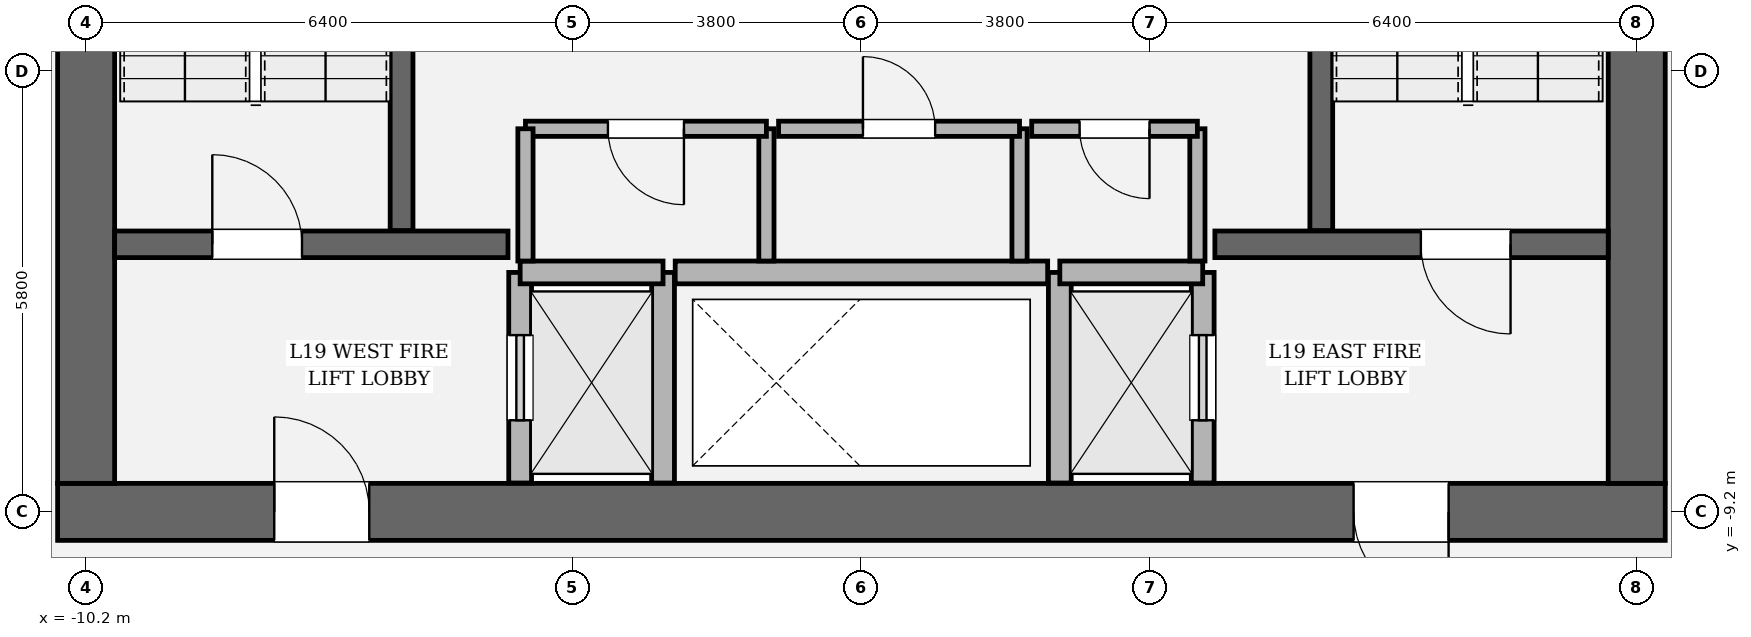
"""IFC4 building model, lengths in metres.
Left out: names, types, materials, properties, quantities, classifications, styles, units other than length and angle.
Written with IfcOpenShell. Run it as: python <this file> out.ifc"""

import sys

from ifc_helpers import new_model, si_unit, direction, frame, frame_2d, origin, place, context, subcontext, project, spatial, rectangle, extrude, element, fill, save


model = new_model("IFC4")
c1 = context("Model", 3, precision=1e-05, world=origin(), true_north=direction((0.0, 1.0)))
c2 = subcontext(c1, "Body", "Model", "MODEL_VIEW")
j1 = project(units=[si_unit("LENGTHUNIT", "METRE"), si_unit("PLANEANGLEUNIT", "RADIAN")], contexts=[c1])
p1 = place(None, origin())
s1 = spatial("IfcSite", under=j1, at=p1, CompositionType="ELEMENT")
p2 = place(p1, origin())
s2 = spatial("IfcBuilding", under=s1, at=p2, CompositionType="ELEMENT")
p3 = place(p2, frame((0.0, 0.0, 84.9)))
s3 = spatial("IfcBuildingStorey", under=s2, at=p3, CompositionType="ELEMENT", Elevation=84.9)
p4 = place(p3, frame((10.575, -9.2, 0.0), z_axis=(0.0, 0.0, 1.0), x_axis=(-1.0, 0.0, 0.0)))
e1 = element("IfcWall", 1, at=p4, inside=s3, PredefinedType="SHEAR", context=c2, shape_type="SweptSolid", body=[
    extrude(rectangle(XDim=21.15, YDim=0.75, at=frame_2d((10.575, 0.0))), origin(), (0.0, 0.0, 1.0), 4.05),
])
p5 = place(p4, frame((2.85, 0.0, 0.0)))
e2 = element("IfcOpeningElement", 2, at=p5, cuts=e1, PredefinedType="OPENING", context=c2, shape_type="SweptSolid", body=[
    extrude(rectangle(XDim=1.25, YDim=2.25, at=frame_2d((0.625, 1.125))), frame((0.0, 0.385, 0.0), z_axis=(0.0, -1.0, 0.0), x_axis=(1.0, 0.0, 0.0)), (0.0, 0.0, 1.0), 0.77),
])
p6 = place(p4, frame((17.05, 0.0, 0.0)))
e3 = element("IfcOpeningElement", 3, at=p6, cuts=e1, PredefinedType="OPENING", context=c2, shape_type="SweptSolid", body=[
    extrude(rectangle(XDim=1.25, YDim=2.25, at=frame_2d((0.625, 1.125))), frame((0.0, 0.385, 0.0), z_axis=(0.0, -1.0, 0.0), x_axis=(1.0, 0.0, 0.0)), (0.0, 0.0, 1.0), 0.77),
])
p7 = place(p3, frame((-10.2, -8.825, 0.0), z_axis=(0.0, 0.0, 1.0), x_axis=(0.0, 1.0, 0.0)))
e4 = element("IfcWall", 4, at=p7, inside=s3, PredefinedType="SHEAR", context=c2, shape_type="SweptSolid", body=[
    extrude(rectangle(XDim=17.65, YDim=0.75, at=frame_2d((8.825, 0.0))), origin(), (0.0, 0.0, 1.0), 4.05),
])
p8 = place(p7, frame((12.615, 0.0, 0.0)))
e5 = element("IfcOpeningElement", 5, at=p8, cuts=e4, PredefinedType="OPENING", context=c2, shape_type="SweptSolid", body=[
    extrude(rectangle(XDim=1.18, YDim=2.2, at=frame_2d((0.59, 1.1))), frame((0.0, 0.385, 0.0), z_axis=(0.0, -1.0, 0.0), x_axis=(1.0, 0.0, 0.0)), (0.0, 0.0, 1.0), 0.77),
])
p9 = place(p3, frame((10.2, 8.825, 0.0), z_axis=(0.0, 0.0, 1.0), x_axis=(0.0, -1.0, 0.0)))
e6 = element("IfcWall", 6, at=p9, inside=s3, PredefinedType="SHEAR", context=c2, shape_type="SweptSolid", body=[
    extrude(rectangle(XDim=17.65, YDim=0.75, at=frame_2d((8.825, 0.0))), origin(), (0.0, 0.0, 1.0), 4.05),
])
p10 = place(p9, frame((3.855, 0.0, 0.0)))
e7 = element("IfcOpeningElement", 7, at=p10, cuts=e6, PredefinedType="OPENING", context=c2, shape_type="SweptSolid", body=[
    extrude(rectangle(XDim=1.18, YDim=2.2, at=frame_2d((0.59, 1.1))), frame((0.0, 0.385, 0.0), z_axis=(0.0, -1.0, 0.0), x_axis=(1.0, 0.0, 0.0)), (0.0, 0.0, 1.0), 0.77),
])
for number, where, z_axis, x_axis in (
    (8, (-6.05, -5.5, 0.0), (0.0, 0.0, 1.0), (0.0, 1.0, 0.0)),
    (9, (6.05, 3.45, 0.0), (0.0, 0.0, 1.0), (0.0, -1.0, 0.0)),
):
    element("IfcWall", number, at=place(p3, frame(where, z_axis=z_axis, x_axis=x_axis)), inside=s3, PredefinedType="SOLIDWALL", context=c2, shape_type="SweptSolid", body=[
        extrude(rectangle(XDim=8.95, YDim=0.3, at=frame_2d((4.475, 0.0))), origin(), (0.0, 0.0, 1.0), 4.05),
    ])
p11 = place(p3, frame((-9.825, -5.68, 0.0), z_axis=(0.0, 0.0, 1.0), x_axis=(1.0, 0.0, 0.0)))
e10 = element("IfcWall", 10, at=p11, inside=s3, PredefinedType="SOLIDWALL", context=c2, shape_type="SweptSolid", body=[
    extrude(rectangle(XDim=5.175, YDim=0.35, at=frame_2d((2.587, 0.0))), origin(), (0.0, 0.0, 1.0), 4.05),
])
p12 = place(p11, frame((1.285, 0.0, 0.0)))
e11 = element("IfcOpeningElement", 11, at=p12, cuts=e10, PredefinedType="OPENING", context=c2, shape_type="SweptSolid", body=[
    extrude(rectangle(XDim=1.18, YDim=2.2, at=frame_2d((0.59, 1.1))), frame((0.0, 0.185, 0.0), z_axis=(0.0, -1.0, 0.0), x_axis=(1.0, 0.0, 0.0)), (0.0, 0.0, 1.0), 0.37),
])
p13 = place(p3, frame((4.65, -5.68, 0.0), z_axis=(0.0, 0.0, 1.0), x_axis=(1.0, 0.0, 0.0)))
e12 = element("IfcWall", 12, at=p13, inside=s3, PredefinedType="SOLIDWALL", context=c2, shape_type="SweptSolid", body=[
    extrude(rectangle(XDim=5.175, YDim=0.35, at=frame_2d((2.587, 0.0))), origin(), (0.0, 0.0, 1.0), 4.05),
])
p14 = place(p13, frame((2.71, 0.0, 0.0)))
e13 = element("IfcOpeningElement", 13, at=p14, cuts=e12, PredefinedType="OPENING", context=c2, shape_type="SweptSolid", body=[
    extrude(rectangle(XDim=1.18, YDim=2.2, at=frame_2d((0.59, 1.1))), frame((0.0, 0.185, 0.0), z_axis=(0.0, -1.0, 0.0), x_axis=(1.0, 0.0, 0.0)), (0.0, 0.0, 1.0), 0.37),
])
p15 = place(p3, frame((-4.49, -8.82, 0.0), z_axis=(0.0, 0.0, 1.0), x_axis=(0.0, 1.0, 0.0)))
e14 = element("IfcWall", 14, at=p15, inside=s3, PredefinedType="SOLIDWALL", context=c2, shape_type="SweptSolid", body=[
    extrude(rectangle(XDim=2.77, YDim=0.3, at=frame_2d((1.385, 0.0))), origin(), (0.0, 0.0, 1.0), 3.81),
])
p16 = place(p15, frame((0.825, 0.0, 0.0)))
e15 = element("IfcOpeningElement", 15, at=p16, cuts=e14, PredefinedType="OPENING", context=c2, shape_type="SweptSolid", body=[
    extrude(rectangle(XDim=1.12, YDim=2.25, at=frame_2d((0.56, 1.125))), frame((0.0, 0.16, 0.0), z_axis=(0.0, -1.0, 0.0), x_axis=(1.0, 0.0, 0.0)), (0.0, 0.0, 1.0), 0.32),
])
p17 = place(p3, frame((-2.61, -8.82, 0.0), z_axis=(0.0, 0.0, 1.0), x_axis=(0.0, 1.0, 0.0)))
e16 = element("IfcWall", 16, at=p17, inside=s3, PredefinedType="SOLIDWALL", context=c2, shape_type="SweptSolid", body=[
    extrude(rectangle(XDim=2.77, YDim=0.3, at=frame_2d((1.385, 0.0))), origin(), (0.0, 0.0, 1.0), 3.81),
])
p18 = place(p3, frame((-4.49, -6.05, 0.0), z_axis=(0.0, 0.0, 1.0), x_axis=(1.0, 0.0, 0.0)))
e17 = element("IfcWall", 17, at=p18, inside=s3, PredefinedType="SOLIDWALL", context=c2, shape_type="SweptSolid", body=[
    extrude(rectangle(XDim=1.88, YDim=0.3, at=frame_2d((0.94, 0.0))), origin(), (0.0, 0.0, 1.0), 3.81),
])
p19 = place(p3, frame((4.49, -8.82, 0.0), z_axis=(0.0, 0.0, 1.0), x_axis=(0.0, 1.0, 0.0)))
e18 = element("IfcWall", 18, at=p19, inside=s3, PredefinedType="SOLIDWALL", context=c2, shape_type="SweptSolid", body=[
    extrude(rectangle(XDim=2.77, YDim=0.3, at=frame_2d((1.385, 0.0))), origin(), (0.0, 0.0, 1.0), 3.81),
])
p20 = place(p19, frame((0.825, 0.0, 0.0)))
e19 = element("IfcOpeningElement", 19, at=p20, cuts=e18, PredefinedType="OPENING", context=c2, shape_type="SweptSolid", body=[
    extrude(rectangle(XDim=1.12, YDim=2.25, at=frame_2d((0.56, 1.125))), frame((0.0, 0.16, 0.0), z_axis=(0.0, -1.0, 0.0), x_axis=(1.0, 0.0, 0.0)), (0.0, 0.0, 1.0), 0.32),
])
p21 = place(p3, frame((2.61, -8.82, 0.0), z_axis=(0.0, 0.0, 1.0), x_axis=(0.0, 1.0, 0.0)))
e20 = element("IfcWall", 20, at=p21, inside=s3, PredefinedType="SOLIDWALL", context=c2, shape_type="SweptSolid", body=[
    extrude(rectangle(XDim=2.77, YDim=0.3, at=frame_2d((1.385, 0.0))), origin(), (0.0, 0.0, 1.0), 3.81),
])
p22 = place(p3, frame((2.61, -6.05, 0.0), z_axis=(0.0, 0.0, 1.0), x_axis=(1.0, 0.0, 0.0)))
e21 = element("IfcWall", 21, at=p22, inside=s3, PredefinedType="SOLIDWALL", context=c2, shape_type="SweptSolid", body=[
    extrude(rectangle(XDim=1.88, YDim=0.3, at=frame_2d((0.94, 0.0))), origin(), (0.0, 0.0, 1.0), 3.81),
])
p23 = place(p3, frame((-2.45, -6.05, 0.0), z_axis=(0.0, 0.0, 1.0), x_axis=(1.0, 0.0, 0.0)))
e22 = element("IfcWall", 22, at=p23, inside=s3, PredefinedType="SOLIDWALL", context=c2, shape_type="SweptSolid", body=[
    extrude(rectangle(XDim=4.9, YDim=0.3, at=frame_2d((2.45, 0.0))), origin(), (0.0, 0.0, 1.0), 3.81),
])
p24 = place(p3, frame((-1.25, -5.9, 0.0), z_axis=(0.0, 0.0, 1.0), x_axis=(0.0, 1.0, 0.0)))
e23 = element("IfcWall", 23, at=p24, inside=s3, PredefinedType="SOLIDWALL", context=c2, shape_type="SweptSolid", body=[
    extrude(rectangle(XDim=1.74, YDim=0.2, at=frame_2d((0.87, 0.0))), origin(), (0.0, 0.0, 1.0), 3.81),
])
p25 = place(p3, frame((-1.25, -4.16, 0.0), z_axis=(0.0, 0.0, 1.0), x_axis=(-1.0, 0.0, 0.0)))
e24 = element("IfcWall", 24, at=p25, inside=s3, PredefinedType="SOLIDWALL", context=c2, shape_type="SweptSolid", body=[
    extrude(rectangle(XDim=3.17, YDim=0.2, at=frame_2d((1.585, 0.0))), origin(), (0.0, 0.0, 1.0), 3.81),
])
p26 = place(p25, frame((1.085, 0.0, 0.0)))
e25 = element("IfcOpeningElement", 25, at=p26, cuts=e24, PredefinedType="OPENING", context=c2, shape_type="SweptSolid", body=[
    extrude(rectangle(XDim=1.0, YDim=2.15, at=frame_2d((0.5, 1.075))), frame((0.0, 0.11, 0.0), z_axis=(0.0, -1.0, 0.0), x_axis=(1.0, 0.0, 0.0)), (0.0, 0.0, 1.0), 0.22),
])
for number, where, z_axis, x_axis in (
    (26, (-4.42, -4.16, 0.0), (0.0, 0.0, 1.0), (0.0, -1.0, 0.0)),
    (27, (2.08, -5.9, 0.0), (0.0, 0.0, 1.0), (0.0, 1.0, 0.0)),
):
    element("IfcWall", number, at=place(p3, frame(where, z_axis=z_axis, x_axis=x_axis)), inside=s3, PredefinedType="SOLIDWALL", context=c2, shape_type="SweptSolid", body=[
        extrude(rectangle(XDim=1.74, YDim=0.2, at=frame_2d((0.87, 0.0))), origin(), (0.0, 0.0, 1.0), 3.81),
    ])
p27 = place(p3, frame((2.08, -4.16, 0.0), z_axis=(0.0, 0.0, 1.0), x_axis=(-1.0, 0.0, 0.0)))
e28 = element("IfcWall", 28, at=p27, inside=s3, PredefinedType="SOLIDWALL", context=c2, shape_type="SweptSolid", body=[
    extrude(rectangle(XDim=3.17, YDim=0.2, at=frame_2d((1.585, 0.0))), origin(), (0.0, 0.0, 1.0), 3.81),
])
p28 = place(p27, frame((1.11, 0.0, 0.0)))
e29 = element("IfcOpeningElement", 29, at=p28, cuts=e28, PredefinedType="OPENING", context=c2, shape_type="SweptSolid", body=[
    extrude(rectangle(XDim=0.95, YDim=2.15, at=frame_2d((0.475, 1.075))), frame((0.0, 0.11, 0.0), z_axis=(0.0, -1.0, 0.0), x_axis=(1.0, 0.0, 0.0)), (0.0, 0.0, 1.0), 0.22),
])
p29 = place(p3, frame((4.42, -5.9, 0.0), z_axis=(0.0, 0.0, 1.0), x_axis=(0.0, 1.0, 0.0)))
e30 = element("IfcWall", 30, at=p29, inside=s3, PredefinedType="SOLIDWALL", context=c2, shape_type="SweptSolid", body=[
    extrude(rectangle(XDim=1.74, YDim=0.2, at=frame_2d((0.87, 0.0))), origin(), (0.0, 0.0, 1.0), 3.81),
])
p30 = place(p3, frame((4.42, -4.16, 0.0), z_axis=(0.0, 0.0, 1.0), x_axis=(-1.0, 0.0, 0.0)))
e31 = element("IfcWall", 31, at=p30, inside=s3, PredefinedType="SOLIDWALL", context=c2, shape_type="SweptSolid", body=[
    extrude(rectangle(XDim=2.18, YDim=0.2, at=frame_2d((1.09, 0.0))), origin(), (0.0, 0.0, 1.0), 3.81),
])
p31 = place(p30, frame((0.63, 0.0, 0.0)))
e32 = element("IfcOpeningElement", 32, at=p31, cuts=e31, PredefinedType="OPENING", context=c2, shape_type="SweptSolid", body=[
    extrude(rectangle(XDim=0.92, YDim=2.1, at=frame_2d((0.46, 1.05))), frame((0.0, 0.11, 0.0), z_axis=(0.0, -1.0, 0.0), x_axis=(1.0, 0.0, 0.0)), (0.0, 0.0, 1.0), 0.22),
])
p32 = place(p12, origin())
e33 = element("IfcDoor", 33, at=p32, inside=s3, OperationType="SINGLE_SWING_LEFT", PredefinedType="DOOR", context=c2, shape_type="SweptSolid", body=[
    extrude(rectangle(XDim=1.18, YDim=2.2, at=frame_2d((0.59, 1.1))), frame((0.0, 0.025, 0.0), z_axis=(0.0, -1.0, 0.0), x_axis=(1.0, 0.0, 0.0)), (0.0, 0.0, 1.0), 0.05),
])
fill(e11, e33)
p33 = place(p14, origin())
e34 = element("IfcDoor", 34, at=p33, inside=s3, OperationType="SINGLE_SWING_RIGHT", PredefinedType="DOOR", context=c2, shape_type="SweptSolid", body=[
    extrude(rectangle(XDim=1.18, YDim=2.2, at=frame_2d((0.59, 1.1))), frame((0.0, 0.025, 0.0), z_axis=(0.0, -1.0, 0.0), x_axis=(1.0, 0.0, 0.0)), (0.0, 0.0, 1.0), 0.05),
])
fill(e13, e34)
p34 = place(p5, origin())
e35 = element("IfcDoor", 35, at=p34, inside=s3, OperationType="SINGLE_SWING_LEFT", PredefinedType="DOOR", context=c2, shape_type="SweptSolid", body=[
    extrude(rectangle(XDim=1.25, YDim=2.25, at=frame_2d((0.625, 1.125))), frame((0.0, 0.025, 0.0), z_axis=(0.0, -1.0, 0.0), x_axis=(1.0, 0.0, 0.0)), (0.0, 0.0, 1.0), 0.05),
])
fill(e2, e35)
p35 = place(p6, origin())
e36 = element("IfcDoor", 36, at=p35, inside=s3, OperationType="SINGLE_SWING_RIGHT", PredefinedType="DOOR", context=c2, shape_type="SweptSolid", body=[
    extrude(rectangle(XDim=1.25, YDim=2.25, at=frame_2d((0.625, 1.125))), frame((0.0, 0.025, 0.0), z_axis=(0.0, -1.0, 0.0), x_axis=(1.0, 0.0, 0.0)), (0.0, 0.0, 1.0), 0.05),
])
fill(e3, e36)
p36 = place(p16, origin())
e37 = element("IfcDoor", 37, at=p36, inside=s3, OperationType="SLIDING_TO_LEFT", PredefinedType="DOOR", context=c2, shape_type="SweptSolid", body=[
    extrude(rectangle(XDim=1.12, YDim=2.25, at=frame_2d((0.56, 1.125))), frame((0.0, 0.025, 0.0), z_axis=(0.0, -1.0, 0.0), x_axis=(1.0, 0.0, 0.0)), (0.0, 0.0, 1.0), 0.05),
])
fill(e15, e37)
p37 = place(p20, origin())
e38 = element("IfcDoor", 38, at=p37, inside=s3, OperationType="SLIDING_TO_RIGHT", PredefinedType="DOOR", context=c2, shape_type="SweptSolid", body=[
    extrude(rectangle(XDim=1.12, YDim=2.25, at=frame_2d((0.56, 1.125))), frame((0.0, 0.025, 0.0), z_axis=(0.0, -1.0, 0.0), x_axis=(1.0, 0.0, 0.0)), (0.0, 0.0, 1.0), 0.05),
])
fill(e19, e38)
p38 = place(p26, origin())
e39 = element("IfcDoor", 39, at=p38, inside=s3, OperationType="SINGLE_SWING_LEFT", PredefinedType="DOOR", context=c2, shape_type="SweptSolid", body=[
    extrude(rectangle(XDim=1.0, YDim=2.15, at=frame_2d((0.5, 1.075))), frame((0.0, 0.025, 0.0), z_axis=(0.0, -1.0, 0.0), x_axis=(1.0, 0.0, 0.0)), (0.0, 0.0, 1.0), 0.05),
])
fill(e25, e39)
p39 = place(p28, origin())
e40 = element("IfcDoor", 40, at=p39, inside=s3, OperationType="SINGLE_SWING_RIGHT", PredefinedType="DOOR", context=c2, shape_type="SweptSolid", body=[
    extrude(rectangle(XDim=0.95, YDim=2.15, at=frame_2d((0.475, 1.075))), frame((0.0, 0.025, 0.0), z_axis=(0.0, -1.0, 0.0), x_axis=(1.0, 0.0, 0.0)), (0.0, 0.0, 1.0), 0.05),
])
fill(e29, e40)
p40 = place(p31, origin())
e41 = element("IfcDoor", 41, at=p40, inside=s3, OperationType="SINGLE_SWING_LEFT", PredefinedType="DOOR", context=c2, shape_type="SweptSolid", body=[
    extrude(rectangle(XDim=0.92, YDim=2.1, at=frame_2d((0.46, 1.05))), frame((0.0, 0.025, 0.0), z_axis=(0.0, -1.0, 0.0), x_axis=(1.0, 0.0, 0.0)), (0.0, 0.0, 1.0), 0.05),
])
fill(e32, e41)
save(model, sys.argv[1])
